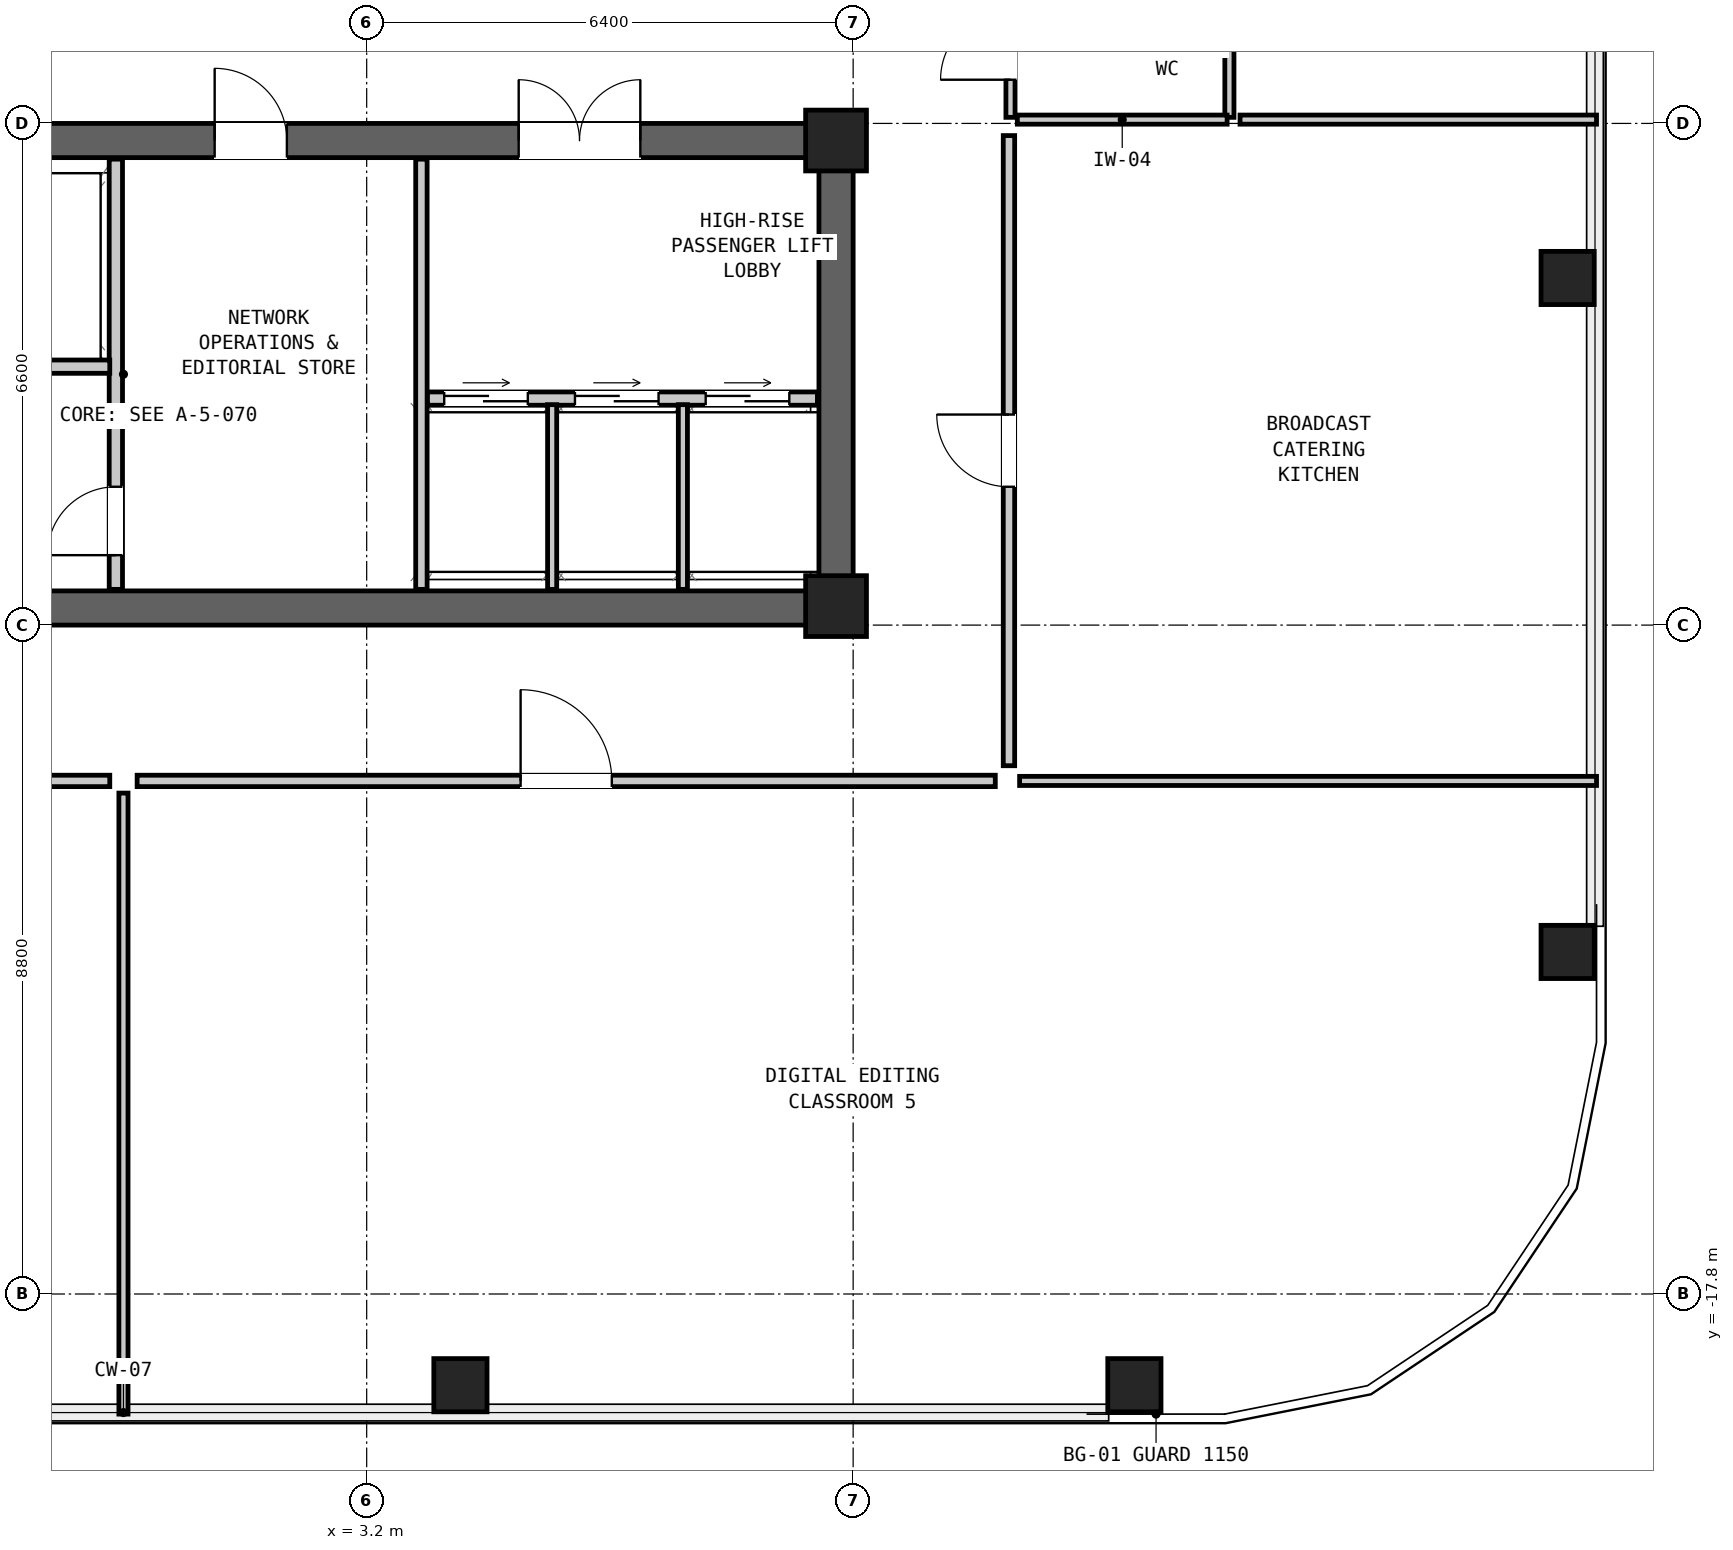
"""IFC4 building model, lengths in metres.
Left out: names, types, materials, properties, quantities, classifications, styles, units other than length and angle.
Written with IfcOpenShell. Run it as: python <this file> out.ifc"""

import sys

from ifc_helpers import new_model, si_unit, direction, frame, frame_2d, origin, origin_2d, place, context, subcontext, project, spatial, rectangle, hollow_rectangle, extrude, element, fill, save


model = new_model("IFC4")
c1 = context("Model", 3, precision=1e-05, world=origin(), true_north=direction((0.0, 1.0)))
c2 = subcontext(c1, "Body", "Model", "MODEL_VIEW")
j1 = project(units=[si_unit("LENGTHUNIT", "METRE"), si_unit("PLANEANGLEUNIT", "RADIAN")], contexts=[c1])
p1 = place(None, origin())
s1 = spatial("IfcSite", under=j1, at=p1, CompositionType="ELEMENT")
p2 = place(p1, origin())
s2 = spatial("IfcBuilding", under=s1, at=p2, CompositionType="ELEMENT")
p3 = place(p2, frame((0.0, 0.0, 226.95)))
s3 = spatial("IfcBuildingStorey", under=s2, at=p3, CompositionType="ELEMENT", Elevation=226.95)
p4 = place(p3, frame((-9.6, -8.775, 0.0), z_axis=(0.0, 0.0, 1.0), x_axis=(1.0, 0.0, 0.0)))
e1 = element("IfcWall", 1, at=p4, inside=s3, PredefinedType="SHEAR", context=c2, shape_type="SweptSolid", body=[
    extrude(rectangle(XDim=19.2, YDim=0.45, at=frame_2d((9.6, 0.0))), origin(), (0.0, 0.0, 1.0), 4.35),
])
p5 = place(p3, frame((-9.6, -2.625, 0.0), z_axis=(0.0, 0.0, 1.0), x_axis=(1.0, 0.0, 0.0)))
e2 = element("IfcWall", 2, at=p5, inside=s3, PredefinedType="SHEAR", context=c2, shape_type="SweptSolid", body=[
    extrude(rectangle(XDim=19.2, YDim=0.45, at=frame_2d((9.6, 0.0))), origin(), (0.0, 0.0, 1.0), 4.35),
])
p6 = place(p5, frame((3.8, 0.0, 0.0)))
e3 = element("IfcOpeningElement", 3, at=p6, cuts=e2, PredefinedType="OPENING", context=c2, shape_type="SweptSolid", body=[
    extrude(rectangle(XDim=1.1, YDim=2.08, at=frame_2d((0.55, 1.04))), frame((0.0, 0.237, 0.0), z_axis=(0.0, -1.0, 0.0), x_axis=(1.0, 0.0, 0.0)), (0.0, 0.0, 1.0), 0.474),
])
p7 = place(p5, frame((10.8, 0.0, 0.0)))
e4 = element("IfcOpeningElement", 4, at=p7, cuts=e2, PredefinedType="OPENING", context=c2, shape_type="SweptSolid", body=[
    extrude(rectangle(XDim=0.95, YDim=2.1, at=frame_2d((0.475, 1.05))), frame((0.0, 0.237, 0.0), z_axis=(0.0, -1.0, 0.0), x_axis=(1.0, 0.0, 0.0)), (0.0, 0.0, 1.0), 0.474),
])
p8 = place(p5, frame((14.8, 0.0, 0.0)))
e5 = element("IfcOpeningElement", 5, at=p8, cuts=e2, PredefinedType="OPENING", context=c2, shape_type="SweptSolid", body=[
    extrude(rectangle(XDim=1.6, YDim=2.12, at=frame_2d((0.8, 1.06))), frame((0.0, 0.237, 0.0), z_axis=(0.0, -1.0, 0.0), x_axis=(1.0, 0.0, 0.0)), (0.0, 0.0, 1.0), 0.474),
])
p9 = place(p3, frame((9.375, -9.0, 0.0), z_axis=(0.0, 0.0, 1.0), x_axis=(0.0, 1.0, 0.0)))
e6 = element("IfcWall", 6, at=p9, inside=s3, PredefinedType="SHEAR", context=c2, shape_type="SweptSolid", body=[
    extrude(rectangle(XDim=6.6, YDim=0.45, at=frame_2d((3.3, 0.0))), origin(), (0.0, 0.0, 1.0), 4.35),
])
for number, where, z_axis, x_axis in (
    (7, (4.433, -19.0, 0.0), (0.0, 0.0, 1.0), (1.0, 0.0, 0.0)),
    (8, (13.3, -19.0, 0.0), (0.0, 0.0, 1.0), (1.0, 0.0, 0.0)),
    (9, (19.0, -13.3, 0.0), (0.0, 0.0, 1.0), (0.0, 1.0, 0.0)),
    (10, (19.0, -4.433, 0.0), (0.0, 0.0, 1.0), (0.0, 1.0, 0.0)),
):
    element("IfcColumn", number, at=place(p3, frame(where, z_axis=z_axis, x_axis=x_axis)), inside=s3, PredefinedType="COLUMN", context=c2, shape_type="SweptSolid", body=[
        extrude(hollow_rectangle(XDim=0.7, YDim=0.7, WallThickness=0.045, at=origin_2d()), origin(), (0.0, 0.0, 1.0), 4.35),
    ])
for number, where, z_axis, x_axis in (
    (11, (9.375, -2.625, 0.0), (0.0, 0.0, 1.0), (1.0, 0.0, 0.0)),
    (12, (9.375, -8.75, 0.0), (0.0, 0.0, 1.0), (1.0, 0.0, 0.0)),
):
    element("IfcColumn", number, at=place(p3, frame(where, z_axis=z_axis, x_axis=x_axis)), inside=s3, PredefinedType="COLUMN", context=c2, shape_type="SweptSolid", body=[
        extrude(rectangle(XDim=0.8, YDim=0.8, at=origin_2d()), origin(), (0.0, 0.0, 1.0), 4.35),
    ])
p10 = place(p3, frame((-0.1, -8.53, 0.0), z_axis=(0.0, 0.0, 1.0), x_axis=(0.0, 1.0, 0.0)))
e13 = element("IfcWall", 13, at=p10, inside=s3, PredefinedType="PARTITIONING", context=c2, shape_type="SweptSolid", body=[
    extrude(rectangle(XDim=5.66, YDim=0.175, at=frame_2d((2.83, 0.0))), origin(), (0.0, 0.0, 1.0), 4.07),
])
p11 = place(p10, frame((0.45, 0.0, 0.0)))
e14 = element("IfcOpeningElement", 14, at=p11, cuts=e13, PredefinedType="OPENING", context=c2, shape_type="SweptSolid", body=[
    extrude(rectangle(XDim=0.9, YDim=2.05, at=frame_2d((0.45, 1.025))), frame((0.0, 0.1, 0.0), z_axis=(0.0, -1.0, 0.0), x_axis=(1.0, 0.0, 0.0)), (0.0, 0.0, 1.0), 0.199),
])
p12 = place(p3, frame((-2.15, -5.6, 0.0), z_axis=(0.0, 0.0, 1.0), x_axis=(1.0, 0.0, 0.0)))
e15 = element("IfcWall", 15, at=p12, inside=s3, PredefinedType="PARTITIONING", context=c2, shape_type="SweptSolid", body=[
    extrude(rectangle(XDim=1.97, YDim=0.175, at=frame_2d((0.985, 0.0))), origin(), (0.0, 0.0, 1.0), 4.07),
])
p13 = place(p3, frame((3.92, -8.53, 0.0), z_axis=(0.0, 0.0, 1.0), x_axis=(0.0, 1.0, 0.0)))
e16 = element("IfcWall", 16, at=p13, inside=s3, PredefinedType="PARTITIONING", context=c2, shape_type="SweptSolid", body=[
    extrude(rectangle(XDim=5.66, YDim=0.15, at=frame_2d((2.83, 0.0))), origin(), (0.0, 0.0, 1.0), 4.07),
])
p14 = place(p3, frame((4.0, -6.02, 0.0), z_axis=(0.0, 0.0, 1.0), x_axis=(1.0, 0.0, 0.0)))
e17 = element("IfcWall", 17, at=p14, inside=s3, PredefinedType="PARTITIONING", context=c2, shape_type="SweptSolid", body=[
    extrude(rectangle(XDim=5.13, YDim=0.175, at=frame_2d((2.565, 0.0))), origin(), (0.0, 0.0, 1.0), 4.07),
])
p15 = place(p14, frame((0.22, 0.0, 0.0)))
e18 = element("IfcOpeningElement", 18, at=p15, cuts=e17, PredefinedType="OPENING", context=c2, shape_type="SweptSolid", body=[
    extrude(rectangle(XDim=1.1, YDim=2.06, at=frame_2d((0.55, 1.03))), frame((0.0, 0.1, 0.0), z_axis=(0.0, -1.0, 0.0), x_axis=(1.0, 0.0, 0.0)), (0.0, 0.0, 1.0), 0.199),
])
p16 = place(p14, frame((1.94, 0.0, 0.0)))
e19 = element("IfcOpeningElement", 19, at=p16, cuts=e17, PredefinedType="OPENING", context=c2, shape_type="SweptSolid", body=[
    extrude(rectangle(XDim=1.1, YDim=2.06, at=frame_2d((0.55, 1.03))), frame((0.0, 0.1, 0.0), z_axis=(0.0, -1.0, 0.0), x_axis=(1.0, 0.0, 0.0)), (0.0, 0.0, 1.0), 0.199),
])
p17 = place(p14, frame((3.66, 0.0, 0.0)))
e20 = element("IfcOpeningElement", 20, at=p17, cuts=e17, PredefinedType="OPENING", context=c2, shape_type="SweptSolid", body=[
    extrude(rectangle(XDim=1.1, YDim=2.06, at=frame_2d((0.55, 1.03))), frame((0.0, 0.1, 0.0), z_axis=(0.0, -1.0, 0.0), x_axis=(1.0, 0.0, 0.0)), (0.0, 0.0, 1.0), 0.199),
])
for number, where, z_axis, x_axis in (
    (21, (5.64, -8.53, 0.0), (0.0, 0.0, 1.0), (0.0, 1.0, 0.0)),
    (22, (7.36, -8.53, 0.0), (0.0, 0.0, 1.0), (0.0, 1.0, 0.0)),
):
    element("IfcWall", number, at=place(p3, frame(where, z_axis=z_axis, x_axis=x_axis)), inside=s3, PredefinedType="PARTITIONING", context=c2, shape_type="SweptSolid", body=[
        extrude(rectangle(XDim=2.43, YDim=0.12, at=frame_2d((1.215, 0.0))), origin(), (0.0, 0.0, 1.0), 4.07),
    ])
p18 = place(p3, frame((11.67, -2.32, 0.0), z_axis=(0.0, 0.0, 1.0), x_axis=(0.0, 1.0, 0.0)))
e23 = element("IfcWall", 23, at=p18, inside=s3, PredefinedType="PARTITIONING", context=c2, shape_type="SweptSolid", body=[
    extrude(rectangle(XDim=1.94, YDim=0.12, at=frame_2d((0.97, 0.0))), origin(), (0.0, 0.0, 1.0), 4.07),
])
p19 = place(p18, frame((0.495, 0.0, 0.0)))
e24 = element("IfcOpeningElement", 24, at=p19, cuts=e23, PredefinedType="OPENING", context=c2, shape_type="SweptSolid", body=[
    extrude(rectangle(XDim=0.92, YDim=2.1, at=frame_2d((0.46, 1.05))), frame((0.0, 0.072, 0.0), z_axis=(0.0, -1.0, 0.0), x_axis=(1.0, 0.0, 0.0)), (0.0, 0.0, 1.0), 0.144),
])
p20 = place(p3, frame((14.55, -2.32, 0.0), z_axis=(0.0, 0.0, 1.0), x_axis=(0.0, 1.0, 0.0)))
e25 = element("IfcWall", 25, at=p20, inside=s3, PredefinedType="PARTITIONING", context=c2, shape_type="SweptSolid", body=[
    extrude(rectangle(XDim=5.93, YDim=0.12, at=frame_2d((2.965, 0.0))), origin(), (0.0, 0.0, 1.0), 4.07),
])
p21 = place(p3, frame((11.76, -2.35, 0.0), z_axis=(0.0, 0.0, 1.0), x_axis=(1.0, 0.0, 0.0)))
e26 = element("IfcWall", 26, at=p21, inside=s3, PredefinedType="PARTITIONING", context=c2, shape_type="SweptSolid", body=[
    extrude(rectangle(XDim=2.76, YDim=0.12, at=frame_2d((1.38, 0.0))), origin(), (0.0, 0.0, 1.0), 2.25),
])
p22 = place(p3, frame((11.79, -11.05, 0.0), z_axis=(0.0, 0.0, 1.0), x_axis=(1.0, 0.0, 0.0)))
e27 = element("IfcWall", 27, at=p22, inside=s3, PredefinedType="PARTITIONING", context=c2, shape_type="SweptSolid", body=[
    extrude(rectangle(XDim=7.59, YDim=0.12, at=frame_2d((3.795, 0.0))), origin(), (0.0, 0.0, 1.0), 2.25),
])
p23 = place(p3, frame((0.0, -19.38, 0.0), z_axis=(0.0, 0.0, 1.0), x_axis=(0.0, 1.0, 0.0)))
e28 = element("IfcWall", 28, at=p23, inside=s3, PredefinedType="PARTITIONING", context=c2, shape_type="SweptSolid", body=[
    extrude(rectangle(XDim=8.17, YDim=0.12, at=frame_2d((4.085, 0.0))), origin(), (0.0, 0.0, 1.0), 2.25),
])
p24 = place(p3, frame((14.69, -2.35, 0.0), z_axis=(0.0, 0.0, 1.0), x_axis=(1.0, 0.0, 0.0)))
e29 = element("IfcWall", 29, at=p24, inside=s3, PredefinedType="PARTITIONING", context=c2, shape_type="SweptSolid", body=[
    extrude(rectangle(XDim=4.69, YDim=0.12, at=frame_2d((2.345, 0.0))), origin(), (0.0, 0.0, 1.0), 2.25),
])
p25 = place(p3, frame((-11.12, -11.05, 0.0), z_axis=(0.0, 0.0, 1.0), x_axis=(1.0, 0.0, 0.0)))
e30 = element("IfcWall", 30, at=p25, inside=s3, PredefinedType="PARTITIONING", context=c2, shape_type="SweptSolid", body=[
    extrude(rectangle(XDim=10.94, YDim=0.15, at=frame_2d((5.47, 0.0))), origin(), (0.0, 0.0, 1.0), 2.25),
])
p26 = place(p25, frame((4.87, 0.0, 0.0)))
e31 = element("IfcOpeningElement", 31, at=p26, cuts=e30, PredefinedType="OPENING", context=c2, shape_type="SweptSolid", body=[
    extrude(rectangle(XDim=1.2, YDim=2.1, at=frame_2d((0.6, 1.05))), frame((0.0, 0.087, 0.0), z_axis=(0.0, -1.0, 0.0), x_axis=(1.0, 0.0, 0.0)), (0.0, 0.0, 1.0), 0.174),
])
p27 = place(p3, frame((0.18, -11.05, 0.0), z_axis=(0.0, 0.0, 1.0), x_axis=(1.0, 0.0, 0.0)))
e32 = element("IfcWall", 32, at=p27, inside=s3, PredefinedType="PARTITIONING", context=c2, shape_type="SweptSolid", body=[
    extrude(rectangle(XDim=11.29, YDim=0.15, at=frame_2d((5.645, 0.0))), origin(), (0.0, 0.0, 1.0), 2.25),
])
p28 = place(p27, frame((5.045, 0.0, 0.0)))
e33 = element("IfcOpeningElement", 33, at=p28, cuts=e32, PredefinedType="OPENING", context=c2, shape_type="SweptSolid", body=[
    extrude(rectangle(XDim=1.2, YDim=2.1, at=frame_2d((0.6, 1.05))), frame((0.0, 0.087, 0.0), z_axis=(0.0, -1.0, 0.0), x_axis=(1.0, 0.0, 0.0)), (0.0, 0.0, 1.0), 0.174),
])
p29 = place(p3, frame((11.65, -10.85, 0.0), z_axis=(0.0, 0.0, 1.0), x_axis=(0.0, 1.0, 0.0)))
e34 = element("IfcWall", 34, at=p29, inside=s3, PredefinedType="PARTITIONING", context=c2, shape_type="SweptSolid", body=[
    extrude(rectangle(XDim=8.29, YDim=0.15, at=frame_2d((4.145, 0.0))), origin(), (0.0, 0.0, 1.0), 4.07),
])
p30 = place(p29, frame((3.67, 0.0, 0.0)))
e35 = element("IfcOpeningElement", 35, at=p30, cuts=e34, PredefinedType="OPENING", context=c2, shape_type="SweptSolid", body=[
    extrude(rectangle(XDim=0.95, YDim=2.1, at=frame_2d((0.475, 1.05))), frame((0.0, 0.087, 0.0), z_axis=(0.0, -1.0, 0.0), x_axis=(1.0, 0.0, 0.0)), (0.0, 0.0, 1.0), 0.174),
])
p31 = place(p11, origin())
e36 = element("IfcDoor", 36, at=p31, inside=s3, OperationType="SINGLE_SWING_LEFT", PredefinedType="DOOR", context=c2, shape_type="SweptSolid", body=[
    extrude(rectangle(XDim=0.9, YDim=2.05, at=frame_2d((0.45, 1.025))), frame((0.0, 0.025, 0.0), z_axis=(0.0, -1.0, 0.0), x_axis=(1.0, 0.0, 0.0)), (0.0, 0.0, 1.0), 0.05),
])
fill(e14, e36)
p32 = place(p7, origin())
e37 = element("IfcDoor", 37, at=p32, inside=s3, OperationType="SINGLE_SWING_LEFT", PredefinedType="DOOR", context=c2, shape_type="SweptSolid", body=[
    extrude(rectangle(XDim=0.95, YDim=2.1, at=frame_2d((0.475, 1.05))), frame((0.0, 0.025, 0.0), z_axis=(0.0, -1.0, 0.0), x_axis=(1.0, 0.0, 0.0)), (0.0, 0.0, 1.0), 0.05),
])
fill(e4, e37)
p33 = place(p15, origin())
e38 = element("IfcDoor", 38, at=p33, inside=s3, OperationType="DOUBLE_DOOR_SLIDING", PredefinedType="DOOR", context=c2, shape_type="SweptSolid", body=[
    extrude(rectangle(XDim=1.1, YDim=2.06, at=frame_2d((0.55, 1.03))), frame((0.0, 0.025, 0.0), z_axis=(0.0, -1.0, 0.0), x_axis=(1.0, 0.0, 0.0)), (0.0, 0.0, 1.0), 0.05),
])
fill(e18, e38)
p34 = place(p16, origin())
e39 = element("IfcDoor", 39, at=p34, inside=s3, OperationType="DOUBLE_DOOR_SLIDING", PredefinedType="DOOR", context=c2, shape_type="SweptSolid", body=[
    extrude(rectangle(XDim=1.1, YDim=2.06, at=frame_2d((0.55, 1.03))), frame((0.0, 0.025, 0.0), z_axis=(0.0, -1.0, 0.0), x_axis=(1.0, 0.0, 0.0)), (0.0, 0.0, 1.0), 0.05),
])
fill(e19, e39)
p35 = place(p17, origin())
e40 = element("IfcDoor", 40, at=p35, inside=s3, OperationType="DOUBLE_DOOR_SLIDING", PredefinedType="DOOR", context=c2, shape_type="SweptSolid", body=[
    extrude(rectangle(XDim=1.1, YDim=2.06, at=frame_2d((0.55, 1.03))), frame((0.0, 0.025, 0.0), z_axis=(0.0, -1.0, 0.0), x_axis=(1.0, 0.0, 0.0)), (0.0, 0.0, 1.0), 0.05),
])
fill(e20, e40)
p36 = place(p8, origin())
e41 = element("IfcDoor", 41, at=p36, inside=s3, OperationType="DOUBLE_DOOR_SINGLE_SWING", PredefinedType="DOOR", context=c2, shape_type="SweptSolid", body=[
    extrude(rectangle(XDim=1.6, YDim=2.12, at=frame_2d((0.8, 1.06))), frame((0.0, 0.025, 0.0), z_axis=(0.0, -1.0, 0.0), x_axis=(1.0, 0.0, 0.0)), (0.0, 0.0, 1.0), 0.05),
])
fill(e5, e41)
p37 = place(p19, origin())
e42 = element("IfcDoor", 42, at=p37, inside=s3, OperationType="SINGLE_SWING_LEFT", PredefinedType="DOOR", context=c2, shape_type="SweptSolid", body=[
    extrude(rectangle(XDim=0.92, YDim=2.1, at=frame_2d((0.46, 1.05))), frame((0.0, 0.025, 0.0), z_axis=(0.0, -1.0, 0.0), x_axis=(1.0, 0.0, 0.0)), (0.0, 0.0, 1.0), 0.05),
])
fill(e24, e42)
p38 = place(p28, origin())
e43 = element("IfcDoor", 43, at=p38, inside=s3, OperationType="SINGLE_SWING_LEFT", PredefinedType="DOOR", context=c2, shape_type="SweptSolid", body=[
    extrude(rectangle(XDim=1.2, YDim=2.1, at=frame_2d((0.6, 1.05))), frame((0.0, 0.025, 0.0), z_axis=(0.0, -1.0, 0.0), x_axis=(1.0, 0.0, 0.0)), (0.0, 0.0, 1.0), 0.05),
])
fill(e33, e43)
p39 = place(p30, origin())
e44 = element("IfcDoor", 44, at=p39, inside=s3, OperationType="SINGLE_SWING_RIGHT", PredefinedType="DOOR", context=c2, shape_type="SweptSolid", body=[
    extrude(rectangle(XDim=0.95, YDim=2.1, at=frame_2d((0.475, 1.05))), frame((0.0, 0.025, 0.0), z_axis=(0.0, -1.0, 0.0), x_axis=(1.0, 0.0, 0.0)), (0.0, 0.0, 1.0), 0.05),
])
fill(e35, e44)
save(model, sys.argv[1])
